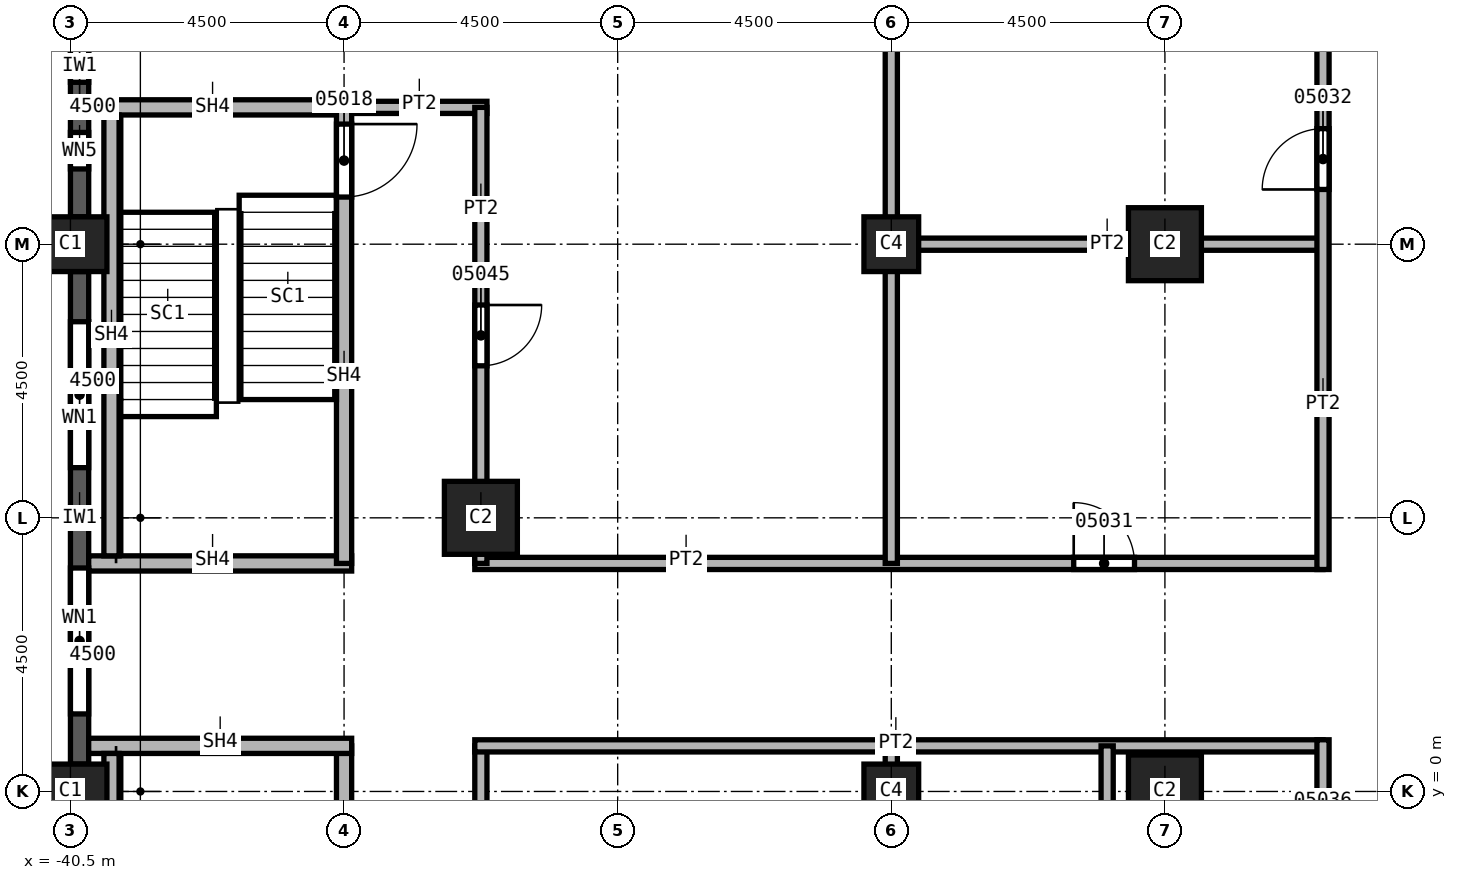
"""IFC4 building model, lengths in metres.
Left out: names, types, materials, properties, quantities, classifications, styles, units other than length and angle.
Written with IfcOpenShell. Run it as: python <this file> out.ifc"""

import sys

from ifc_helpers import new_model, si_unit, direction, frame, frame_2d, origin, origin_2d, place, context, subcontext, project, spatial, rectangle, extrude, element, fill, save


model = new_model("IFC4")
c1 = context("Model", 3, precision=1e-05, world=origin(), true_north=direction((0.0, 1.0)))
c2 = subcontext(c1, "Body", "Model", "MODEL_VIEW")
j1 = project(units=[si_unit("LENGTHUNIT", "METRE"), si_unit("PLANEANGLEUNIT", "RADIAN")], contexts=[c1])
p1 = place(None, origin())
s1 = spatial("IfcSite", under=j1, at=p1, CompositionType="ELEMENT")
p2 = place(p1, origin())
s2 = spatial("IfcBuilding", under=s1, at=p2, CompositionType="ELEMENT")
p3 = place(p2, frame((0.0, 0.0, 116.0)))
s3 = spatial("IfcBuildingStorey", under=s2, at=p3, CompositionType="ELEMENT", Elevation=116.0)
for number, where, z_axis, x_axis in (
    (1, (-40.5, 0.0, 0.0), (0.0, 0.0, 1.0), (0.0, 1.0, 0.0)),
    (2, (-40.5, 9.0, 0.0), (0.0, 0.0, 1.0), (0.0, 1.0, 0.0)),
):
    element("IfcColumn", number, at=place(p3, frame(where, z_axis=z_axis, x_axis=x_axis)), inside=s3, PredefinedType="COLUMN", context=c2, shape_type="SweptSolid", body=[
        extrude(rectangle(XDim=0.9, YDim=1.2, at=origin_2d()), origin(), (0.0, 0.0, 1.0), 3.6),
    ])
for number, where, z_axis, x_axis in (
    (3, (-33.75, 4.5, 0.0), (0.0, 0.0, 1.0), (1.0, 0.0, 0.0)),
    (4, (-22.5, 0.0, 0.0), (0.0, 0.0, 1.0), (1.0, 0.0, 0.0)),
    (5, (-22.5, 9.0, 0.0), (0.0, 0.0, 1.0), (1.0, 0.0, 0.0)),
):
    element("IfcColumn", number, at=place(p3, frame(where, z_axis=z_axis, x_axis=x_axis)), inside=s3, PredefinedType="COLUMN", context=c2, shape_type="SweptSolid", body=[
        extrude(rectangle(XDim=1.2, YDim=1.2, at=origin_2d()), origin(), (0.0, 0.0, 1.0), 3.6),
    ])
for number, where, z_axis, x_axis in (
    (6, (-27.0, 0.0, 0.0), (0.0, 0.0, 1.0), (1.0, 0.0, 0.0)),
    (7, (-27.0, 9.0, 0.0), (0.0, 0.0, 1.0), (1.0, 0.0, 0.0)),
):
    element("IfcColumn", number, at=place(p3, frame(where, z_axis=z_axis, x_axis=x_axis)), inside=s3, PredefinedType="COLUMN", context=c2, shape_type="SweptSolid", body=[
        extrude(rectangle(XDim=0.9, YDim=0.9, at=origin_2d()), origin(), (0.0, 0.0, 1.0), 3.6),
    ])
p4 = place(p3, frame((-40.35, 13.05, 0.0), z_axis=(0.0, 0.0, 1.0), x_axis=(0.0, -1.0, 0.0)))
e8 = element("IfcWall", 8, at=p4, inside=s3, PredefinedType="SOLIDWALL", context=c2, shape_type="SweptSolid", body=[
    extrude(rectangle(XDim=3.6, YDim=0.3, at=frame_2d((1.8, 0.0))), origin(), (0.0, 0.0, 1.0), 3.0),
])
p5 = place(p4, frame((0.788, 0.0, 0.8)))
e9 = element("IfcOpeningElement", 9, at=p5, cuts=e8, PredefinedType="OPENING", context=c2, shape_type="SweptSolid", body=[
    extrude(rectangle(XDim=0.6, YDim=1.95, at=frame_2d((0.3, 0.975))), frame((0.0, 0.15, 0.0), z_axis=(0.0, -1.0, 0.0), x_axis=(1.0, 0.0, 0.0)), (0.0, 0.0, 1.0), 0.3),
])
p6 = place(p4, frame((2.212, 0.0, 0.8)))
e10 = element("IfcOpeningElement", 10, at=p6, cuts=e8, PredefinedType="OPENING", context=c2, shape_type="SweptSolid", body=[
    extrude(rectangle(XDim=0.6, YDim=1.95, at=frame_2d((0.3, 0.975))), frame((0.0, 0.15, 0.0), z_axis=(0.0, -1.0, 0.0), x_axis=(1.0, 0.0, 0.0)), (0.0, 0.0, 1.0), 0.3),
])
p7 = place(p3, frame((-40.35, 8.55, 0.0), z_axis=(0.0, 0.0, 1.0), x_axis=(0.0, -1.0, 0.0)))
e11 = element("IfcWall", 11, at=p7, inside=s3, PredefinedType="SOLIDWALL", context=c2, shape_type="SweptSolid", body=[
    extrude(rectangle(XDim=8.1, YDim=0.3, at=frame_2d((4.05, 0.0))), origin(), (0.0, 0.0, 1.0), 3.0),
])
p8 = place(p7, frame((0.825, 0.0, 0.8)))
e12 = element("IfcOpeningElement", 12, at=p8, cuts=e11, PredefinedType="OPENING", context=c2, shape_type="SweptSolid", body=[
    extrude(rectangle(XDim=2.4, YDim=1.95, at=frame_2d((1.2, 0.975))), frame((0.0, 0.15, 0.0), z_axis=(0.0, -1.0, 0.0), x_axis=(1.0, 0.0, 0.0)), (0.0, 0.0, 1.0), 0.3),
])
p9 = place(p7, frame((4.875, 0.0, 0.8)))
e13 = element("IfcOpeningElement", 13, at=p9, cuts=e11, PredefinedType="OPENING", context=c2, shape_type="SweptSolid", body=[
    extrude(rectangle(XDim=2.4, YDim=1.95, at=frame_2d((1.2, 0.975))), frame((0.0, 0.15, 0.0), z_axis=(0.0, -1.0, 0.0), x_axis=(1.0, 0.0, 0.0)), (0.0, 0.0, 1.0), 0.3),
])
p10 = place(p3, frame((-36.0, 11.25, 0.0), z_axis=(0.0, 0.0, 1.0), x_axis=(1.0, 0.0, 0.0)))
e14 = element("IfcWall", 14, at=p10, inside=s3, PredefinedType="PARTITIONING", context=c2, shape_type="SweptSolid", body=[
    extrude(rectangle(XDim=2.35, YDim=0.2, at=frame_2d((1.175, 0.0))), origin(), (0.0, 0.0, 1.0), 3.6),
])
p11 = place(p3, frame((-33.85, 3.75, 0.0), z_axis=(0.0, 0.0, 1.0), x_axis=(1.0, 0.0, 0.0)))
e15 = element("IfcWall", 15, at=p11, inside=s3, PredefinedType="PARTITIONING", context=c2, shape_type="SweptSolid", body=[
    extrude(rectangle(XDim=13.95, YDim=0.2, at=frame_2d((6.975, 0.0))), origin(), (0.0, 0.0, 1.0), 3.6),
])
p12 = place(p11, frame((9.85, 0.0, 0.0)))
e16 = element("IfcOpeningElement", 16, at=p12, cuts=e15, PredefinedType="OPENING", context=c2, shape_type="SweptSolid", body=[
    extrude(rectangle(XDim=1.0, YDim=2.1, at=frame_2d((0.5, 1.05))), frame((0.0, 0.1, 0.0), z_axis=(0.0, -1.0, 0.0), x_axis=(1.0, 0.0, 0.0)), (0.0, 0.0, 1.0), 0.2),
])
p13 = place(p3, frame((-33.75, 0.75, 0.0), z_axis=(0.0, 0.0, 1.0), x_axis=(0.0, -1.0, 0.0)))
e17 = element("IfcWall", 17, at=p13, inside=s3, PredefinedType="PARTITIONING", context=c2, shape_type="SweptSolid", body=[
    extrude(rectangle(XDim=7.6, YDim=0.2, at=frame_2d((3.8, 0.0))), origin(), (0.0, 0.0, 1.0), 3.6),
])
p14 = place(p13, frame((2.35, 0.0, 0.0)))
e18 = element("IfcOpeningElement", 18, at=p14, cuts=e17, PredefinedType="OPENING", context=c2, shape_type="SweptSolid", body=[
    extrude(rectangle(XDim=1.0, YDim=2.1, at=frame_2d((0.5, 1.05))), frame((0.0, 0.1, 0.0), z_axis=(0.0, -1.0, 0.0), x_axis=(1.0, 0.0, 0.0)), (0.0, 0.0, 1.0), 0.2),
])
p15 = place(p3, frame((-33.75, 11.25, 0.0), z_axis=(0.0, 0.0, 1.0), x_axis=(0.0, -1.0, 0.0)))
e19 = element("IfcWall", 19, at=p15, inside=s3, PredefinedType="PARTITIONING", context=c2, shape_type="SweptSolid", body=[
    extrude(rectangle(XDim=7.5, YDim=0.2, at=frame_2d((3.75, 0.0))), origin(), (0.0, 0.0, 1.0), 3.6),
])
p16 = place(p15, frame((3.25, 0.0, 0.0)))
e20 = element("IfcOpeningElement", 20, at=p16, cuts=e19, PredefinedType="OPENING", context=c2, shape_type="SweptSolid", body=[
    extrude(rectangle(XDim=1.0, YDim=2.1, at=frame_2d((0.5, 1.05))), frame((0.0, 0.1, 0.0), z_axis=(0.0, -1.0, 0.0), x_axis=(1.0, 0.0, 0.0)), (0.0, 0.0, 1.0), 0.2),
])
p17 = place(p3, frame((-27.1, 9.0, 0.0), z_axis=(0.0, 0.0, 1.0), x_axis=(1.0, 0.0, 0.0)))
e21 = element("IfcWall", 21, at=p17, inside=s3, PredefinedType="PARTITIONING", context=c2, shape_type="SweptSolid", body=[
    extrude(rectangle(XDim=7.2, YDim=0.2, at=frame_2d((3.6, 0.0))), origin(), (0.0, 0.0, 1.0), 3.6),
])
p18 = place(p3, frame((-27.0, -17.4, 0.0), z_axis=(0.0, 0.0, 1.0), x_axis=(0.0, 1.0, 0.0)))
e22 = element("IfcWall", 22, at=p18, inside=s3, PredefinedType="PARTITIONING", context=c2, shape_type="SweptSolid", body=[
    extrude(rectangle(XDim=18.15, YDim=0.2, at=frame_2d((9.075, 0.0))), origin(), (0.0, 0.0, 1.0), 3.6),
])
p19 = place(p3, frame((-27.0, 3.75, 0.0), z_axis=(0.0, 0.0, 1.0), x_axis=(0.0, 1.0, 0.0)))
e23 = element("IfcWall", 23, at=p19, inside=s3, PredefinedType="PARTITIONING", context=c2, shape_type="SweptSolid", body=[
    extrude(rectangle(XDim=13.65, YDim=0.2, at=frame_2d((6.825, 0.0))), origin(), (0.0, 0.0, 1.0), 3.6),
])
p20 = place(p3, frame((-19.9, 0.75, 0.0), z_axis=(0.0, 0.0, 1.0), x_axis=(-1.0, 0.0, 0.0)))
e24 = element("IfcWall", 24, at=p20, inside=s3, PredefinedType="PARTITIONING", context=c2, shape_type="SweptSolid", body=[
    extrude(rectangle(XDim=13.95, YDim=0.2, at=frame_2d((6.975, 0.0))), origin(), (0.0, 0.0, 1.0), 3.6),
])
p21 = place(p3, frame((-23.45, -15.75, 0.0), z_axis=(0.0, 0.0, 1.0), x_axis=(0.0, 1.0, 0.0)))
e25 = element("IfcWall", 25, at=p21, inside=s3, PredefinedType="PARTITIONING", context=c2, shape_type="SweptSolid", body=[
    extrude(rectangle(XDim=16.5, YDim=0.2, at=frame_2d((8.25, 0.0))), origin(), (0.0, 0.0, 1.0), 3.6),
])
p22 = place(p21, frame((7.6, 0.0, 0.0)))
e26 = element("IfcOpeningElement", 26, at=p22, cuts=e25, PredefinedType="OPENING", context=c2, shape_type="SweptSolid", body=[
    extrude(rectangle(XDim=1.0, YDim=2.1, at=frame_2d((0.5, 1.05))), frame((0.0, 0.1, 0.0), z_axis=(0.0, -1.0, 0.0), x_axis=(1.0, 0.0, 0.0)), (0.0, 0.0, 1.0), 0.2),
])
p23 = place(p21, frame((13.15, 0.0, 0.0)))
e27 = element("IfcOpeningElement", 27, at=p23, cuts=e25, PredefinedType="OPENING", context=c2, shape_type="SweptSolid", body=[
    extrude(rectangle(XDim=1.0, YDim=2.1, at=frame_2d((0.5, 1.05))), frame((0.0, 0.1, 0.0), z_axis=(0.0, -1.0, 0.0), x_axis=(1.0, 0.0, 0.0)), (0.0, 0.0, 1.0), 0.2),
])
p24 = place(p3, frame((-19.9, -24.5, 0.0), z_axis=(0.0, 0.0, 1.0), x_axis=(0.0, 1.0, 0.0)))
e28 = element("IfcWall", 28, at=p24, inside=s3, PredefinedType="PARTITIONING", context=c2, shape_type="SweptSolid", body=[
    extrude(rectangle(XDim=25.35, YDim=0.2, at=frame_2d((12.675, 0.0))), origin(), (0.0, 0.0, 1.0), 3.6),
])
p25 = place(p24, frame((2.05, 0.0, 0.0)))
e29 = element("IfcOpeningElement", 29, at=p25, cuts=e28, PredefinedType="OPENING", context=c2, shape_type="SweptSolid", body=[
    extrude(rectangle(XDim=1.0, YDim=2.1, at=frame_2d((0.5, 1.05))), frame((0.0, 0.1, 0.0), z_axis=(0.0, -1.0, 0.0), x_axis=(1.0, 0.0, 0.0)), (0.0, 0.0, 1.0), 0.2),
])
p26 = place(p24, frame((10.1, 0.0, 0.0)))
e30 = element("IfcOpeningElement", 30, at=p26, cuts=e28, PredefinedType="OPENING", context=c2, shape_type="SweptSolid", body=[
    extrude(rectangle(XDim=1.0, YDim=2.1, at=frame_2d((0.5, 1.05))), frame((0.0, 0.1, 0.0), z_axis=(0.0, -1.0, 0.0), x_axis=(1.0, 0.0, 0.0)), (0.0, 0.0, 1.0), 0.2),
])
p27 = place(p24, frame((22.85, 0.0, 0.0)))
e31 = element("IfcOpeningElement", 31, at=p27, cuts=e28, PredefinedType="OPENING", context=c2, shape_type="SweptSolid", body=[
    extrude(rectangle(XDim=1.0, YDim=2.1, at=frame_2d((0.5, 1.05))), frame((0.0, 0.1, 0.0), z_axis=(0.0, -1.0, 0.0), x_axis=(1.0, 0.0, 0.0)), (0.0, 0.0, 1.0), 0.2),
])
p28 = place(p3, frame((-19.9, 3.65, 0.0), z_axis=(0.0, 0.0, 1.0), x_axis=(0.0, 1.0, 0.0)))
e32 = element("IfcWall", 32, at=p28, inside=s3, PredefinedType="PARTITIONING", context=c2, shape_type="SweptSolid", body=[
    extrude(rectangle(XDim=9.95, YDim=0.2, at=frame_2d((4.975, 0.0))), origin(), (0.0, 0.0, 1.0), 3.6),
])
p29 = place(p28, frame((6.25, 0.0, 0.0)))
e33 = element("IfcOpeningElement", 33, at=p29, cuts=e32, PredefinedType="OPENING", context=c2, shape_type="SweptSolid", body=[
    extrude(rectangle(XDim=1.0, YDim=2.1, at=frame_2d((0.5, 1.05))), frame((0.0, 0.1, 0.0), z_axis=(0.0, -1.0, 0.0), x_axis=(1.0, 0.0, 0.0)), (0.0, 0.0, 1.0), 0.2),
])
p30 = place(p3, frame((-40.2, 3.75, 0.0), z_axis=(0.0, 0.0, 1.0), x_axis=(1.0, 0.0, 0.0)))
e34 = element("IfcWall", 34, at=p30, inside=s3, PredefinedType="SOLIDWALL", context=c2, shape_type="SweptSolid", body=[
    extrude(rectangle(XDim=4.325, YDim=0.25, at=frame_2d((2.163, 0.0))), origin(), (0.0, 0.0, 1.0), 3.6),
])
p31 = place(p3, frame((-40.2, 11.25, 0.0), z_axis=(0.0, 0.0, 1.0), x_axis=(1.0, 0.0, 0.0)))
e35 = element("IfcWall", 35, at=p31, inside=s3, PredefinedType="SOLIDWALL", context=c2, shape_type="SweptSolid", body=[
    extrude(rectangle(XDim=4.2, YDim=0.25, at=frame_2d((2.1, 0.0))), origin(), (0.0, 0.0, 1.0), 3.6),
])
p32 = place(p3, frame((-36.0, 0.75, 0.0), z_axis=(0.0, 0.0, 1.0), x_axis=(0.0, -1.0, 0.0)))
e36 = element("IfcWall", 36, at=p32, inside=s3, PredefinedType="SOLIDWALL", context=c2, shape_type="SweptSolid", body=[
    extrude(rectangle(XDim=7.625, YDim=0.25, at=frame_2d((3.812, 0.0))), origin(), (0.0, 0.0, 1.0), 3.6),
])
p33 = place(p32, frame((5.95, 0.0, 0.0)))
e37 = element("IfcOpeningElement", 37, at=p33, cuts=e36, PredefinedType="OPENING", context=c2, shape_type="SweptSolid", body=[
    extrude(rectangle(XDim=1.2, YDim=2.1, at=frame_2d((0.6, 1.05))), frame((0.0, 0.125, 0.0), z_axis=(0.0, -1.0, 0.0), x_axis=(1.0, 0.0, 0.0)), (0.0, 0.0, 1.0), 0.25),
])
p34 = place(p3, frame((-36.0, 11.375, 0.0), z_axis=(0.0, 0.0, 1.0), x_axis=(0.0, -1.0, 0.0)))
e38 = element("IfcWall", 38, at=p34, inside=s3, PredefinedType="SOLIDWALL", context=c2, shape_type="SweptSolid", body=[
    extrude(rectangle(XDim=7.625, YDim=0.25, at=frame_2d((3.812, 0.0))), origin(), (0.0, 0.0, 1.0), 3.6),
])
p35 = place(p34, frame((0.4, 0.0, 0.0)))
e39 = element("IfcOpeningElement", 39, at=p35, cuts=e38, PredefinedType="OPENING", context=c2, shape_type="SweptSolid", body=[
    extrude(rectangle(XDim=1.2, YDim=2.1, at=frame_2d((0.6, 1.05))), frame((0.0, 0.125, 0.0), z_axis=(0.0, -1.0, 0.0), x_axis=(1.0, 0.0, 0.0)), (0.0, 0.0, 1.0), 0.25),
])
p36 = place(p3, frame((-35.875, 0.75, 0.0), z_axis=(0.0, 0.0, 1.0), x_axis=(-1.0, 0.0, 0.0)))
e40 = element("IfcWall", 40, at=p36, inside=s3, PredefinedType="SOLIDWALL", context=c2, shape_type="SweptSolid", body=[
    extrude(rectangle(XDim=4.325, YDim=0.25, at=frame_2d((2.163, 0.0))), origin(), (0.0, 0.0, 1.0), 3.6),
])
for number, where, z_axis, x_axis in (
    (41, (-39.825, 3.875, 0.0), (0.0, 0.0, 1.0), (0.0, 1.0, 0.0)),
    (42, (-39.825, -6.625, 0.0), (0.0, 0.0, 1.0), (0.0, 1.0, 0.0)),
):
    element("IfcWall", number, at=place(p3, frame(where, z_axis=z_axis, x_axis=x_axis)), inside=s3, PredefinedType="SOLIDWALL", context=c2, shape_type="SweptSolid", body=[
        extrude(rectangle(XDim=7.25, YDim=0.25, at=frame_2d((3.625, 0.0))), origin(), (0.0, 0.0, 1.0), 3.6),
    ])
p37 = place(p8, origin())
e43 = element("IfcWindow", 43, at=p37, inside=s3, PartitioningType="SINGLE_PANEL", PredefinedType="WINDOW", context=c2, shape_type="SweptSolid", body=[
    extrude(rectangle(XDim=2.4, YDim=1.95, at=frame_2d((1.2, 0.975))), frame((0.0, 0.03, 0.0), z_axis=(0.0, -1.0, 0.0), x_axis=(1.0, 0.0, 0.0)), (0.0, 0.0, 1.0), 0.06),
])
fill(e12, e43)
p38 = place(p9, origin())
e44 = element("IfcWindow", 44, at=p38, inside=s3, PartitioningType="SINGLE_PANEL", PredefinedType="WINDOW", context=c2, shape_type="SweptSolid", body=[
    extrude(rectangle(XDim=2.4, YDim=1.95, at=frame_2d((1.2, 0.975))), frame((0.0, 0.03, 0.0), z_axis=(0.0, -1.0, 0.0), x_axis=(1.0, 0.0, 0.0)), (0.0, 0.0, 1.0), 0.06),
])
fill(e13, e44)
p39 = place(p35, origin())
e45 = element("IfcDoor", 45, at=p39, inside=s3, OperationType="SINGLE_SWING_LEFT", PredefinedType="DOOR", context=c2, shape_type="SweptSolid", body=[
    extrude(rectangle(XDim=1.2, YDim=2.1, at=frame_2d((0.6, 1.05))), frame((0.0, 0.025, 0.0), z_axis=(0.0, -1.0, 0.0), x_axis=(1.0, 0.0, 0.0)), (0.0, 0.0, 1.0), 0.05),
])
fill(e39, e45)
p40 = place(p12, origin())
e46 = element("IfcDoor", 46, at=p40, inside=s3, OperationType="SINGLE_SWING_RIGHT", PredefinedType="DOOR", context=c2, shape_type="SweptSolid", body=[
    extrude(rectangle(XDim=1.0, YDim=2.1, at=frame_2d((0.5, 1.05))), frame((0.0, 0.025, 0.0), z_axis=(0.0, -1.0, 0.0), x_axis=(1.0, 0.0, 0.0)), (0.0, 0.0, 1.0), 0.05),
])
fill(e16, e46)
p41 = place(p29, origin())
e47 = element("IfcDoor", 47, at=p41, inside=s3, OperationType="SINGLE_SWING_LEFT", PredefinedType="DOOR", context=c2, shape_type="SweptSolid", body=[
    extrude(rectangle(XDim=1.0, YDim=2.1, at=frame_2d((0.5, 1.05))), frame((0.0, 0.025, 0.0), z_axis=(0.0, -1.0, 0.0), x_axis=(1.0, 0.0, 0.0)), (0.0, 0.0, 1.0), 0.05),
])
fill(e33, e47)
p42 = place(p16, origin())
e48 = element("IfcDoor", 48, at=p42, inside=s3, OperationType="SINGLE_SWING_RIGHT", PredefinedType="DOOR", context=c2, shape_type="SweptSolid", body=[
    extrude(rectangle(XDim=1.0, YDim=2.1, at=frame_2d((0.5, 1.05))), frame((0.0, 0.025, 0.0), z_axis=(0.0, -1.0, 0.0), x_axis=(1.0, 0.0, 0.0)), (0.0, 0.0, 1.0), 0.05),
])
fill(e20, e48)
p43 = place(p5, origin())
e49 = element("IfcWindow", 49, at=p43, inside=s3, PartitioningType="SINGLE_PANEL", PredefinedType="WINDOW", context=c2, shape_type="SweptSolid", body=[
    extrude(rectangle(XDim=0.6, YDim=1.95, at=frame_2d((0.3, 0.975))), frame((0.0, 0.03, 0.0), z_axis=(0.0, -1.0, 0.0), x_axis=(1.0, 0.0, 0.0)), (0.0, 0.0, 1.0), 0.06),
])
fill(e9, e49)
p44 = place(p6, origin())
e50 = element("IfcWindow", 50, at=p44, inside=s3, PartitioningType="SINGLE_PANEL", PredefinedType="WINDOW", context=c2, shape_type="SweptSolid", body=[
    extrude(rectangle(XDim=0.6, YDim=1.95, at=frame_2d((0.3, 0.975))), frame((0.0, 0.03, 0.0), z_axis=(0.0, -1.0, 0.0), x_axis=(1.0, 0.0, 0.0)), (0.0, 0.0, 1.0), 0.06),
])
fill(e10, e50)
save(model, sys.argv[1])
